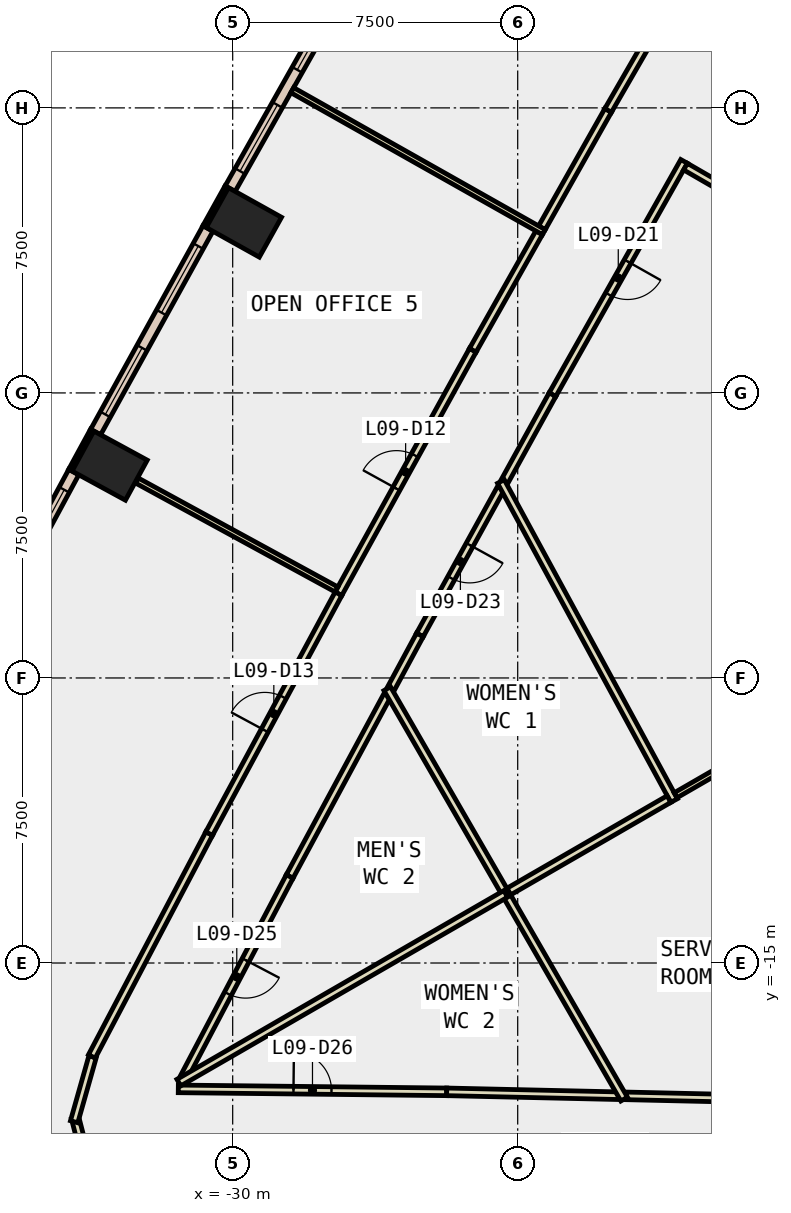
"""IFC4 building model, lengths in metres.
Left out: names, types, materials, properties, quantities, classifications, styles, units other than length and angle.
Written with IfcOpenShell. Run it as: python <this file> out.ifc"""

import sys

from ifc_helpers import new_model, si_unit, direction, frame, frame_2d, origin, origin_2d, place, context, subcontext, project, spatial, rectangle, extrude, element, fill, save


model = new_model("IFC4")
c1 = context("Model", 3, precision=1e-05, world=origin(), true_north=direction((0.0, 1.0)))
c2 = subcontext(c1, "Body", "Model", "MODEL_VIEW")
j1 = project(units=[si_unit("LENGTHUNIT", "METRE"), si_unit("PLANEANGLEUNIT", "RADIAN")], contexts=[c1])
p1 = place(None, origin())
s1 = spatial("IfcSite", under=j1, at=p1, CompositionType="ELEMENT")
p2 = place(p1, origin())
s2 = spatial("IfcBuilding", under=s1, at=p2, CompositionType="ELEMENT")
p3 = place(p2, frame((0.0, 0.0, 47.6)))
s3 = spatial("IfcBuildingStorey", under=s2, at=p3, CompositionType="ELEMENT", Elevation=47.6)
for number, where, z_axis, x_axis in (
    (1, (-29.706, 4.487, -0.4), (0.0, 0.0, 1.0), (0.487, 0.873, 0.0)),
    (2, (-33.238, -1.913, -0.4), (0.0, 0.0, 1.0), (0.478, 0.878, 0.0)),
):
    element("IfcColumn", number, at=place(p3, frame(where, z_axis=z_axis, x_axis=x_axis)), inside=s3, PredefinedType="COLUMN", context=c2, shape_type="SweptSolid", body=[
        extrude(rectangle(XDim=1.2, YDim=1.6, at=origin_2d()), origin(), (0.0, 0.0, 1.0), 4.2),
    ])
p4 = place(p3, frame((-30.156, 5.425, 0.0), z_axis=(0.0, 0.0, 1.0), x_axis=(-0.486730996044, -0.87355190887, 0.0)))
e3 = element("IfcWall", 3, at=p4, inside=s3, PredefinedType="STANDARD", context=c2, shape_type="SweptSolid", body=[
    extrude(rectangle(XDim=1.2, YDim=0.1, at=frame_2d((0.6, 0.0))), origin(), (0.0, 0.0, 1.0), 3.8),
])
p5 = place(p3, frame((-33.697, -0.98, 0.0), z_axis=(0.0, 0.0, 1.0), x_axis=(-0.478267644701, -0.878214131082, 0.0)))
e4 = element("IfcWall", 4, at=p5, inside=s3, PredefinedType="STANDARD", context=c2, shape_type="SweptSolid", body=[
    extrude(rectangle(XDim=1.2, YDim=0.1, at=frame_2d((0.6, 0.0))), origin(), (0.0, 0.0, 1.0), 3.8),
])
p6 = place(p3, frame((-27.058, 10.705, 0.0), z_axis=(0.0, 0.0, 1.0), x_axis=(-0.49151046248, -0.870871669807, 0.0)))
e5 = element("IfcWall", 5, at=p6, inside=s3, PredefinedType="STANDARD", context=c2, shape_type="SweptSolid", body=[
    extrude(rectangle(XDim=6.122, YDim=0.3, at=frame_2d((3.061, 0.0))), origin(), (0.0, 0.0, 1.0), 3.8),
])
p7 = place(p6, frame((0.53, 0.0, 0.9)))
e6 = element("IfcOpeningElement", 6, at=p7, cuts=e5, PredefinedType="OPENING", context=c2, shape_type="SweptSolid", body=[
    extrude(rectangle(XDim=2.0, YDim=2.6, at=frame_2d((1.0, 1.3))), frame((0.0, 0.16, 0.0), z_axis=(0.0, -1.0, 0.0), x_axis=(1.0, 0.0, 0.0)), (0.0, 0.0, 1.0), 0.32),
])
p8 = place(p6, frame((3.591, 0.0, 0.9)))
e7 = element("IfcOpeningElement", 7, at=p8, cuts=e5, PredefinedType="OPENING", context=c2, shape_type="SweptSolid", body=[
    extrude(rectangle(XDim=2.0, YDim=2.6, at=frame_2d((1.0, 1.3))), frame((0.0, 0.16, 0.0), z_axis=(0.0, -1.0, 0.0), x_axis=(1.0, 0.0, 0.0)), (0.0, 0.0, 1.0), 0.32),
])
p9 = place(p3, frame((-30.65, 4.328, 0.0), z_axis=(0.0, 0.0, 1.0), x_axis=(-0.483195456594, -0.875512507465, 0.0)))
e8 = element("IfcWall", 8, at=p9, inside=s3, PredefinedType="STANDARD", context=c2, shape_type="SweptSolid", body=[
    extrude(rectangle(XDim=6.12, YDim=0.3, at=frame_2d((3.06, 0.0))), origin(), (0.0, 0.0, 1.0), 3.8),
])
p10 = place(p9, frame((0.53, 0.0, 0.9)))
e9 = element("IfcOpeningElement", 9, at=p10, cuts=e8, PredefinedType="OPENING", context=c2, shape_type="SweptSolid", body=[
    extrude(rectangle(XDim=2.0, YDim=2.6, at=frame_2d((1.0, 1.3))), frame((0.0, 0.16, 0.0), z_axis=(0.0, -1.0, 0.0), x_axis=(1.0, 0.0, 0.0)), (0.0, 0.0, 1.0), 0.32),
])
p11 = place(p9, frame((3.59, 0.0, 0.9)))
e10 = element("IfcOpeningElement", 10, at=p11, cuts=e8, PredefinedType="OPENING", context=c2, shape_type="SweptSolid", body=[
    extrude(rectangle(XDim=2.0, YDim=2.6, at=frame_2d((1.0, 1.3))), frame((0.0, 0.16, 0.0), z_axis=(0.0, -1.0, 0.0), x_axis=(1.0, 0.0, 0.0)), (0.0, 0.0, 1.0), 0.32),
])
p12 = place(p3, frame((-34.181, -2.082, 0.0), z_axis=(0.0, 0.0, 1.0), x_axis=(-0.474584950749, -0.880209704856, 0.0)))
e11 = element("IfcWall", 11, at=p12, inside=s3, PredefinedType="STANDARD", context=c2, shape_type="SweptSolid", body=[
    extrude(rectangle(XDim=6.121, YDim=0.3, at=frame_2d((3.061, 0.0))), origin(), (0.0, 0.0, 1.0), 3.8),
])
p13 = place(p12, frame((0.53, 0.0, 0.9)))
e12 = element("IfcOpeningElement", 12, at=p13, cuts=e11, PredefinedType="OPENING", context=c2, shape_type="SweptSolid", body=[
    extrude(rectangle(XDim=2.0, YDim=2.6, at=frame_2d((1.0, 1.3))), frame((0.0, 0.16, 0.0), z_axis=(0.0, -1.0, 0.0), x_axis=(1.0, 0.0, 0.0)), (0.0, 0.0, 1.0), 0.32),
])
p14 = place(p12, frame((3.591, 0.0, 0.9)))
e13 = element("IfcOpeningElement", 13, at=p14, cuts=e11, PredefinedType="OPENING", context=c2, shape_type="SweptSolid", body=[
    extrude(rectangle(XDim=2.0, YDim=2.6, at=frame_2d((1.0, 1.3))), frame((0.0, 0.16, 0.0), z_axis=(0.0, -1.0, 0.0), x_axis=(1.0, 0.0, 0.0)), (0.0, 0.0, 1.0), 0.32),
])
p15 = place(p3, frame((-18.122, 6.092, 0.0), z_axis=(0.0, 0.0, 1.0), x_axis=(-0.491430359405, -0.870916874251, 0.0)))
e14 = element("IfcWall", 14, at=p15, inside=s3, PredefinedType="PARTITIONING", context=c2, shape_type="SweptSolid", body=[
    extrude(rectangle(XDim=7.047, YDim=0.2, at=frame_2d((3.523, 0.0))), origin(), (0.0, 0.0, 1.0), 3.8),
])
p16 = place(p15, frame((3.024, 0.0, 0.0)))
e15 = element("IfcOpeningElement", 15, at=p16, cuts=e14, PredefinedType="OPENING", context=c2, shape_type="SweptSolid", body=[
    extrude(rectangle(XDim=1.0, YDim=2.1, at=frame_2d((0.5, 1.05))), frame((0.0, 0.11, 0.0), z_axis=(0.0, -1.0, 0.0), x_axis=(1.0, 0.0, 0.0)), (0.0, 0.0, 1.0), 0.22),
])
p17 = place(p3, frame((-21.585, -0.045, 0.0), z_axis=(0.0, 0.0, 1.0), x_axis=(-0.483139162319, -0.875543573921, 0.0)))
e16 = element("IfcWall", 16, at=p17, inside=s3, PredefinedType="PARTITIONING", context=c2, shape_type="SweptSolid", body=[
    extrude(rectangle(XDim=2.61, YDim=0.2, at=frame_2d((1.305, 0.0))), origin(), (0.0, 0.0, 1.0), 3.8),
])
p18 = place(p3, frame((-22.942, -2.505, 0.0), z_axis=(0.0, 0.0, 1.0), x_axis=(-0.48320751977, -0.875505849688, 0.0)))
e17 = element("IfcWall", 17, at=p18, inside=s3, PredefinedType="PARTITIONING", context=c2, shape_type="SweptSolid", body=[
    extrude(rectangle(XDim=4.412, YDim=0.2, at=frame_2d((2.206, 0.0))), origin(), (0.0, 0.0, 1.0), 3.8),
])
p19 = place(p18, frame((1.706, 0.0, 0.0)))
e18 = element("IfcOpeningElement", 18, at=p19, cuts=e17, PredefinedType="OPENING", context=c2, shape_type="SweptSolid", body=[
    extrude(rectangle(XDim=1.0, YDim=2.1, at=frame_2d((0.5, 1.05))), frame((0.0, 0.11, 0.0), z_axis=(0.0, -1.0, 0.0), x_axis=(1.0, 0.0, 0.0)), (0.0, 0.0, 1.0), 0.22),
])
p20 = place(p3, frame((-25.074, -6.368, 0.0), z_axis=(0.0, 0.0, 1.0), x_axis=(-0.474616646546, -0.880192614614, 0.0)))
e19 = element("IfcWall", 19, at=p20, inside=s3, PredefinedType="PARTITIONING", context=c2, shape_type="SweptSolid", body=[
    extrude(rectangle(XDim=1.605, YDim=0.2, at=frame_2d((0.803, 0.0))), origin(), (0.0, 0.0, 1.0), 3.8),
])
p21 = place(p3, frame((-19.649, -18.496, 0.0), z_axis=(0.0, 0.0, 1.0), x_axis=(0.999744980574, -0.02258259988, 0.0)))
e20 = element("IfcWall", 20, at=p21, inside=s3, PredefinedType="PARTITIONING", context=c2, shape_type="SweptSolid", body=[
    extrude(rectangle(XDim=3.676, YDim=0.2, at=frame_2d((1.838, 0.0))), origin(), (0.0, 0.0, 1.0), 3.8),
])
p22 = place(p3, frame((-25.931, -7.957, 0.0), z_axis=(0.0, 0.0, 1.0), x_axis=(-0.474554072379, -0.880226352928, 0.0)))
e21 = element("IfcWall", 21, at=p22, inside=s3, PredefinedType="PARTITIONING", context=c2, shape_type="SweptSolid", body=[
    extrude(rectangle(XDim=5.416, YDim=0.2, at=frame_2d((2.708, 0.0))), origin(), (0.0, 0.0, 1.0), 3.8),
])
p23 = place(p3, frame((-28.501, -12.724, 0.0), z_axis=(0.0, 0.0, 1.0), x_axis=(-0.465933418625, -0.884819783576, 0.0)))
e22 = element("IfcWall", 22, at=p23, inside=s3, PredefinedType="PARTITIONING", context=c2, shape_type="SweptSolid", body=[
    extrude(rectangle(XDim=5.973, YDim=0.2, at=frame_2d((2.986, 0.0))), origin(), (0.0, 0.0, 1.0), 3.8),
])
p24 = place(p23, frame((2.486, 0.0, 0.0)))
e23 = element("IfcOpeningElement", 23, at=p24, cuts=e22, PredefinedType="OPENING", context=c2, shape_type="SweptSolid", body=[
    extrude(rectangle(XDim=1.0, YDim=2.1, at=frame_2d((0.5, 1.05))), frame((0.0, 0.11, 0.0), z_axis=(0.0, -1.0, 0.0), x_axis=(1.0, 0.0, 0.0)), (0.0, 0.0, 1.0), 0.22),
])
p25 = place(p3, frame((-31.431, -18.312, 0.0), z_axis=(0.0, 0.0, 1.0), x_axis=(0.999939195602, -0.011027470214, 0.0)))
e24 = element("IfcWall", 24, at=p25, inside=s3, PredefinedType="PARTITIONING", context=c2, shape_type="SweptSolid", body=[
    extrude(rectangle(XDim=7.062, YDim=0.2, at=frame_2d((3.531, 0.0))), origin(), (0.0, 0.0, 1.0), 3.8),
])
p26 = place(p25, frame((3.031, 0.0, 0.0)))
e25 = element("IfcOpeningElement", 25, at=p26, cuts=e24, PredefinedType="OPENING", context=c2, shape_type="SweptSolid", body=[
    extrude(rectangle(XDim=1.0, YDim=2.1, at=frame_2d((0.5, 1.05))), frame((0.0, 0.11, 0.0), z_axis=(0.0, -1.0, 0.0), x_axis=(1.0, 0.0, 0.0)), (0.0, 0.0, 1.0), 0.22),
])
p27 = place(p3, frame((-24.369, -18.39, 0.0), z_axis=(0.0, 0.0, 1.0), x_axis=(0.99974519793, -0.022572975354, 0.0)))
e26 = element("IfcWall", 26, at=p27, inside=s3, PredefinedType="PARTITIONING", context=c2, shape_type="SweptSolid", body=[
    extrude(rectangle(XDim=4.521, YDim=0.2, at=frame_2d((2.26, 0.0))), origin(), (0.0, 0.0, 1.0), 3.8),
])
p28 = place(p3, frame((-21.863, 4.345, 0.0), z_axis=(0.0, 0.0, 1.0), x_axis=(0.491394823876, 0.87093692485, 0.0)))
e27 = element("IfcWall", 27, at=p28, inside=s3, PredefinedType="PARTITIONING", context=c2, shape_type="SweptSolid", body=[
    extrude(rectangle(XDim=3.547, YDim=0.2, at=frame_2d((1.773, 0.0))), origin(), (0.0, 0.0, 1.0), 3.8),
])
p29 = place(p3, frame((-20.12, 7.434, 0.0), z_axis=(0.0, 0.0, 1.0), x_axis=(0.500039488902, 0.866002603656, 0.0)))
e28 = element("IfcWall", 28, at=p29, inside=s3, PredefinedType="PARTITIONING", context=c2, shape_type="SweptSolid", body=[
    extrude(rectangle(XDim=7.244, YDim=0.2, at=frame_2d((3.622, 0.0))), origin(), (0.0, 0.0, 1.0), 3.8),
])
p30 = place(p29, frame((3.122, 0.0, 0.0)))
e29 = element("IfcOpeningElement", 29, at=p30, cuts=e28, PredefinedType="OPENING", context=c2, shape_type="SweptSolid", body=[
    extrude(rectangle(XDim=1.0, YDim=2.1, at=frame_2d((0.5, 1.05))), frame((0.0, 0.11, 0.0), z_axis=(0.0, -1.0, 0.0), x_axis=(1.0, 0.0, 0.0)), (0.0, 0.0, 1.0), 0.22),
])
p31 = place(p3, frame((-27.217, -5.284, 0.0), z_axis=(0.0, 0.0, 1.0), x_axis=(0.483151415114, 0.875536812517, 0.0)))
e30 = element("IfcWall", 30, at=p31, inside=s3, PredefinedType="PARTITIONING", context=c2, shape_type="SweptSolid", body=[
    extrude(rectangle(XDim=7.319, YDim=0.2, at=frame_2d((3.659, 0.0))), origin(), (0.0, 0.0, 1.0), 3.8),
])
p32 = place(p31, frame((3.159, 0.0, 0.0)))
e31 = element("IfcOpeningElement", 31, at=p32, cuts=e30, PredefinedType="OPENING", context=c2, shape_type="SweptSolid", body=[
    extrude(rectangle(XDim=1.0, YDim=2.1, at=frame_2d((0.5, 1.05))), frame((0.0, 0.11, 0.0), z_axis=(0.0, -1.0, 0.0), x_axis=(1.0, 0.0, 0.0)), (0.0, 0.0, 1.0), 0.22),
])
p33 = place(p3, frame((-23.681, 1.124, 0.0), z_axis=(0.0, 0.0, 1.0), x_axis=(0.491485799319, 0.870885588965, 0.0)))
e32 = element("IfcWall", 32, at=p33, inside=s3, PredefinedType="PARTITIONING", context=c2, shape_type="SweptSolid", body=[
    extrude(rectangle(XDim=3.548, YDim=0.2, at=frame_2d((1.774, 0.0))), origin(), (0.0, 0.0, 1.0), 3.8),
])
p34 = place(p3, frame((-33.521, -20.105, 0.0), z_axis=(0.0, 0.0, 1.0), x_axis=(-0.713535335808, 0.700619243636, 0.0)))
e33 = element("IfcWall", 33, at=p34, inside=s3, PredefinedType="PARTITIONING", context=c2, shape_type="SweptSolid", body=[
    extrude(rectangle(XDim=0.775, YDim=0.2, at=frame_2d((0.387, 0.0))), origin(), (0.0, 0.0, 1.0), 3.8),
])
p35 = place(p3, frame((-34.003, -19.631, 0.0), z_axis=(0.0, 0.0, 1.0), x_axis=(-0.250111961061, 0.968216921425, 0.0)))
e34 = element("IfcWall", 34, at=p35, inside=s3, PredefinedType="PARTITIONING", context=c2, shape_type="SweptSolid", body=[
    extrude(rectangle(XDim=0.568, YDim=0.2, at=frame_2d((0.284, 0.0))), origin(), (0.0, 0.0, 1.0), 3.8),
])
p36 = place(p3, frame((-34.172, -19.177, 0.0), z_axis=(0.0, 0.0, 1.0), x_axis=(0.272780480932, 0.962076301144, 0.0)))
e35 = element("IfcWall", 35, at=p36, inside=s3, PredefinedType="PARTITIONING", context=c2, shape_type="SweptSolid", body=[
    extrude(rectangle(XDim=1.778, YDim=0.2, at=frame_2d((0.889, 0.0))), origin(), (0.0, 0.0, 1.0), 3.8),
])
p37 = place(p3, frame((-33.706, -17.458, 0.0), z_axis=(0.0, 0.0, 1.0), x_axis=(0.465905874098, 0.884834287582, 0.0)))
e36 = element("IfcWall", 36, at=p37, inside=s3, PredefinedType="PARTITIONING", context=c2, shape_type="SweptSolid", body=[
    extrude(rectangle(XDim=6.626, YDim=0.2, at=frame_2d((3.313, 0.0))), origin(), (0.0, 0.0, 1.0), 3.8),
])
p38 = place(p3, frame((-30.619, -11.595, 0.0), z_axis=(0.0, 0.0, 1.0), x_axis=(0.474595197669, 0.880204179921, 0.0)))
e37 = element("IfcWall", 37, at=p38, inside=s3, PredefinedType="PARTITIONING", context=c2, shape_type="SweptSolid", body=[
    extrude(rectangle(XDim=7.17, YDim=0.2, at=frame_2d((3.585, 0.0))), origin(), (0.0, 0.0, 1.0), 3.8),
])
p39 = place(p38, frame((3.085, 0.0, 0.0)))
e38 = element("IfcOpeningElement", 38, at=p39, cuts=e37, PredefinedType="OPENING", context=c2, shape_type="SweptSolid", body=[
    extrude(rectangle(XDim=1.0, YDim=2.1, at=frame_2d((0.5, 1.05))), frame((0.0, 0.11, 0.0), z_axis=(0.0, -1.0, 0.0), x_axis=(1.0, 0.0, 0.0)), (0.0, 0.0, 1.0), 0.22),
])
p40 = place(p3, frame((-18.384, -10.725, 0.0), z_axis=(0.0, 0.0, 1.0), x_axis=(-0.477137547132, 0.878828630119, 0.0)))
e39 = element("IfcWall", 39, at=p40, inside=s3, PredefinedType="PARTITIONING", context=c2, shape_type="SweptSolid", body=[
    extrude(rectangle(XDim=9.552, YDim=0.2, at=frame_2d((4.776, 0.0))), origin(), (0.0, 0.0, 1.0), 3.8),
])
p41 = place(p3, frame((-17.033, -9.829, 0.0), z_axis=(0.0, 0.0, 1.0), x_axis=(-0.866094414679, -0.49988045057, 0.0)))
e40 = element("IfcWall", 40, at=p41, inside=s3, PredefinedType="PARTITIONING", context=c2, shape_type="SweptSolid", body=[
    extrude(rectangle(XDim=1.516, YDim=0.15, at=frame_2d((0.758, 0.0))), origin(), (0.0, 0.0, 1.0), 3.8),
])
p42 = place(p3, frame((-18.519, -10.687, 0.0), z_axis=(0.0, 0.0, 1.0), x_axis=(-0.866063668779, -0.499933717229, 0.0)))
e41 = element("IfcWall", 41, at=p42, inside=s3, PredefinedType="PARTITIONING", context=c2, shape_type="SweptSolid", body=[
    extrude(rectangle(XDim=4.969, YDim=0.2, at=frame_2d((2.484, 0.0))), origin(), (0.0, 0.0, 1.0), 3.8),
])
p43 = place(p3, frame((-22.822, -13.171, 0.0), z_axis=(0.0, 0.0, 1.0), x_axis=(-0.499974913987, 0.866039886717, 0.0)))
e42 = element("IfcWall", 42, at=p43, inside=s3, PredefinedType="PARTITIONING", context=c2, shape_type="SweptSolid", body=[
    extrude(rectangle(XDim=6.222, YDim=0.2, at=frame_2d((3.111, 0.0))), origin(), (0.0, 0.0, 1.0), 3.8),
])
p44 = place(p3, frame((-19.699, -18.581, 0.0), z_axis=(0.0, 0.0, 1.0), x_axis=(-0.499899838407, 0.866083224385, 0.0)))
e43 = element("IfcWall", 43, at=p44, inside=s3, PredefinedType="PARTITIONING", context=c2, shape_type="SweptSolid", body=[
    extrude(rectangle(XDim=6.235, YDim=0.2, at=frame_2d((3.118, 0.0))), origin(), (0.0, 0.0, 1.0), 3.8),
])
p45 = place(p3, frame((-22.816, -13.181, 0.0), z_axis=(0.0, 0.0, 1.0), x_axis=(-0.86601529143, -0.500017514703, 0.0)))
e44 = element("IfcWall", 44, at=p45, inside=s3, PredefinedType="PARTITIONING", context=c2, shape_type="SweptSolid", body=[
    extrude(rectangle(XDim=9.932, YDim=0.2, at=frame_2d((4.966, 0.0))), origin(), (0.0, 0.0, 1.0), 3.8),
])
p46 = place(p3, frame((-21.813, 4.231, 0.0), z_axis=(0.0, 0.0, 1.0), x_axis=(-0.870901264369, 0.491458022337, 0.0)))
e45 = element("IfcWall", 45, at=p46, inside=s3, PredefinedType="PARTITIONING", context=c2, shape_type="SweptSolid", body=[
    extrude(rectangle(XDim=7.6, YDim=0.15, at=frame_2d((3.8, 0.0))), origin(), (0.0, 0.0, 1.0), 3.8),
])
p47 = place(p3, frame((-27.268, -5.171, 0.0), z_axis=(0.0, 0.0, 1.0), x_axis=(-0.877837854343, 0.478957932895, 0.0)))
e46 = element("IfcWall", 46, at=p47, inside=s3, PredefinedType="PARTITIONING", context=c2, shape_type="SweptSolid", body=[
    extrude(rectangle(XDim=5.982, YDim=0.15, at=frame_2d((2.991, 0.0))), origin(), (0.0, 0.0, 1.0), 3.8),
])
p48 = place(p3, frame((-13.85, 3.51, 0.0), z_axis=(0.0, 0.0, 1.0), x_axis=(-0.865969361037, 0.500097056325, 0.0)))
e47 = element("IfcWall", 47, at=p48, inside=s3, PredefinedType="PARTITIONING", context=c2, shape_type="SweptSolid", body=[
    extrude(rectangle(XDim=4.889, YDim=0.2, at=frame_2d((2.445, 0.0))), origin(), (0.0, 0.0, 1.0), 3.8),
])
p49 = place(p7, origin())
e48 = element("IfcWindow", 48, at=p49, inside=s3, PartitioningType="SINGLE_PANEL", PredefinedType="WINDOW", context=c2, shape_type="SweptSolid", body=[
    extrude(rectangle(XDim=2.0, YDim=2.6, at=frame_2d((1.0, 1.3))), frame((0.0, 0.03, 0.0), z_axis=(0.0, -1.0, 0.0), x_axis=(1.0, 0.0, 0.0)), (0.0, 0.0, 1.0), 0.06),
])
fill(e6, e48)
p50 = place(p8, origin())
e49 = element("IfcWindow", 49, at=p50, inside=s3, PartitioningType="SINGLE_PANEL", PredefinedType="WINDOW", context=c2, shape_type="SweptSolid", body=[
    extrude(rectangle(XDim=2.0, YDim=2.6, at=frame_2d((1.0, 1.3))), frame((0.0, 0.03, 0.0), z_axis=(0.0, -1.0, 0.0), x_axis=(1.0, 0.0, 0.0)), (0.0, 0.0, 1.0), 0.06),
])
fill(e7, e49)
p51 = place(p10, origin())
e50 = element("IfcWindow", 50, at=p51, inside=s3, PartitioningType="SINGLE_PANEL", PredefinedType="WINDOW", context=c2, shape_type="SweptSolid", body=[
    extrude(rectangle(XDim=2.0, YDim=2.6, at=frame_2d((1.0, 1.3))), frame((0.0, 0.03, 0.0), z_axis=(0.0, -1.0, 0.0), x_axis=(1.0, 0.0, 0.0)), (0.0, 0.0, 1.0), 0.06),
])
fill(e9, e50)
p52 = place(p11, origin())
e51 = element("IfcWindow", 51, at=p52, inside=s3, PartitioningType="SINGLE_PANEL", PredefinedType="WINDOW", context=c2, shape_type="SweptSolid", body=[
    extrude(rectangle(XDim=2.0, YDim=2.6, at=frame_2d((1.0, 1.3))), frame((0.0, 0.03, 0.0), z_axis=(0.0, -1.0, 0.0), x_axis=(1.0, 0.0, 0.0)), (0.0, 0.0, 1.0), 0.06),
])
fill(e10, e51)
p53 = place(p13, origin())
e52 = element("IfcWindow", 52, at=p53, inside=s3, PartitioningType="SINGLE_PANEL", PredefinedType="WINDOW", context=c2, shape_type="SweptSolid", body=[
    extrude(rectangle(XDim=2.0, YDim=2.6, at=frame_2d((1.0, 1.3))), frame((0.0, 0.03, 0.0), z_axis=(0.0, -1.0, 0.0), x_axis=(1.0, 0.0, 0.0)), (0.0, 0.0, 1.0), 0.06),
])
fill(e12, e52)
p54 = place(p32, origin())
e53 = element("IfcDoor", 53, at=p54, inside=s3, OperationType="SINGLE_SWING_LEFT", PredefinedType="DOOR", context=c2, shape_type="SweptSolid", body=[
    extrude(rectangle(XDim=1.0, YDim=2.1, at=frame_2d((0.5, 1.05))), frame((0.0, 0.025, 0.0), z_axis=(0.0, -1.0, 0.0), x_axis=(1.0, 0.0, 0.0)), (0.0, 0.0, 1.0), 0.05),
])
fill(e31, e53)
p55 = place(p39, origin())
e54 = element("IfcDoor", 54, at=p55, inside=s3, OperationType="SINGLE_SWING_LEFT", PredefinedType="DOOR", context=c2, shape_type="SweptSolid", body=[
    extrude(rectangle(XDim=1.0, YDim=2.1, at=frame_2d((0.5, 1.05))), frame((0.0, 0.025, 0.0), z_axis=(0.0, -1.0, 0.0), x_axis=(1.0, 0.0, 0.0)), (0.0, 0.0, 1.0), 0.05),
])
fill(e38, e54)
p56 = place(p16, origin())
e55 = element("IfcDoor", 55, at=p56, inside=s3, OperationType="SINGLE_SWING_LEFT", PredefinedType="DOOR", context=c2, shape_type="SweptSolid", body=[
    extrude(rectangle(XDim=1.0, YDim=2.1, at=frame_2d((0.5, 1.05))), frame((0.0, 0.025, 0.0), z_axis=(0.0, -1.0, 0.0), x_axis=(1.0, 0.0, 0.0)), (0.0, 0.0, 1.0), 0.05),
])
fill(e15, e55)
p57 = place(p19, origin())
e56 = element("IfcDoor", 56, at=p57, inside=s3, OperationType="SINGLE_SWING_LEFT", PredefinedType="DOOR", context=c2, shape_type="SweptSolid", body=[
    extrude(rectangle(XDim=1.0, YDim=2.1, at=frame_2d((0.5, 1.05))), frame((0.0, 0.025, 0.0), z_axis=(0.0, -1.0, 0.0), x_axis=(1.0, 0.0, 0.0)), (0.0, 0.0, 1.0), 0.05),
])
fill(e18, e56)
p58 = place(p24, origin())
e57 = element("IfcDoor", 57, at=p58, inside=s3, OperationType="SINGLE_SWING_LEFT", PredefinedType="DOOR", context=c2, shape_type="SweptSolid", body=[
    extrude(rectangle(XDim=1.0, YDim=2.1, at=frame_2d((0.5, 1.05))), frame((0.0, 0.025, 0.0), z_axis=(0.0, -1.0, 0.0), x_axis=(1.0, 0.0, 0.0)), (0.0, 0.0, 1.0), 0.05),
])
fill(e23, e57)
p59 = place(p26, origin())
e58 = element("IfcDoor", 58, at=p59, inside=s3, OperationType="SINGLE_SWING_LEFT", PredefinedType="DOOR", context=c2, shape_type="SweptSolid", body=[
    extrude(rectangle(XDim=1.0, YDim=2.1, at=frame_2d((0.5, 1.05))), frame((0.0, 0.025, 0.0), z_axis=(0.0, -1.0, 0.0), x_axis=(1.0, 0.0, 0.0)), (0.0, 0.0, 1.0), 0.05),
])
fill(e25, e58)
save(model, sys.argv[1])
